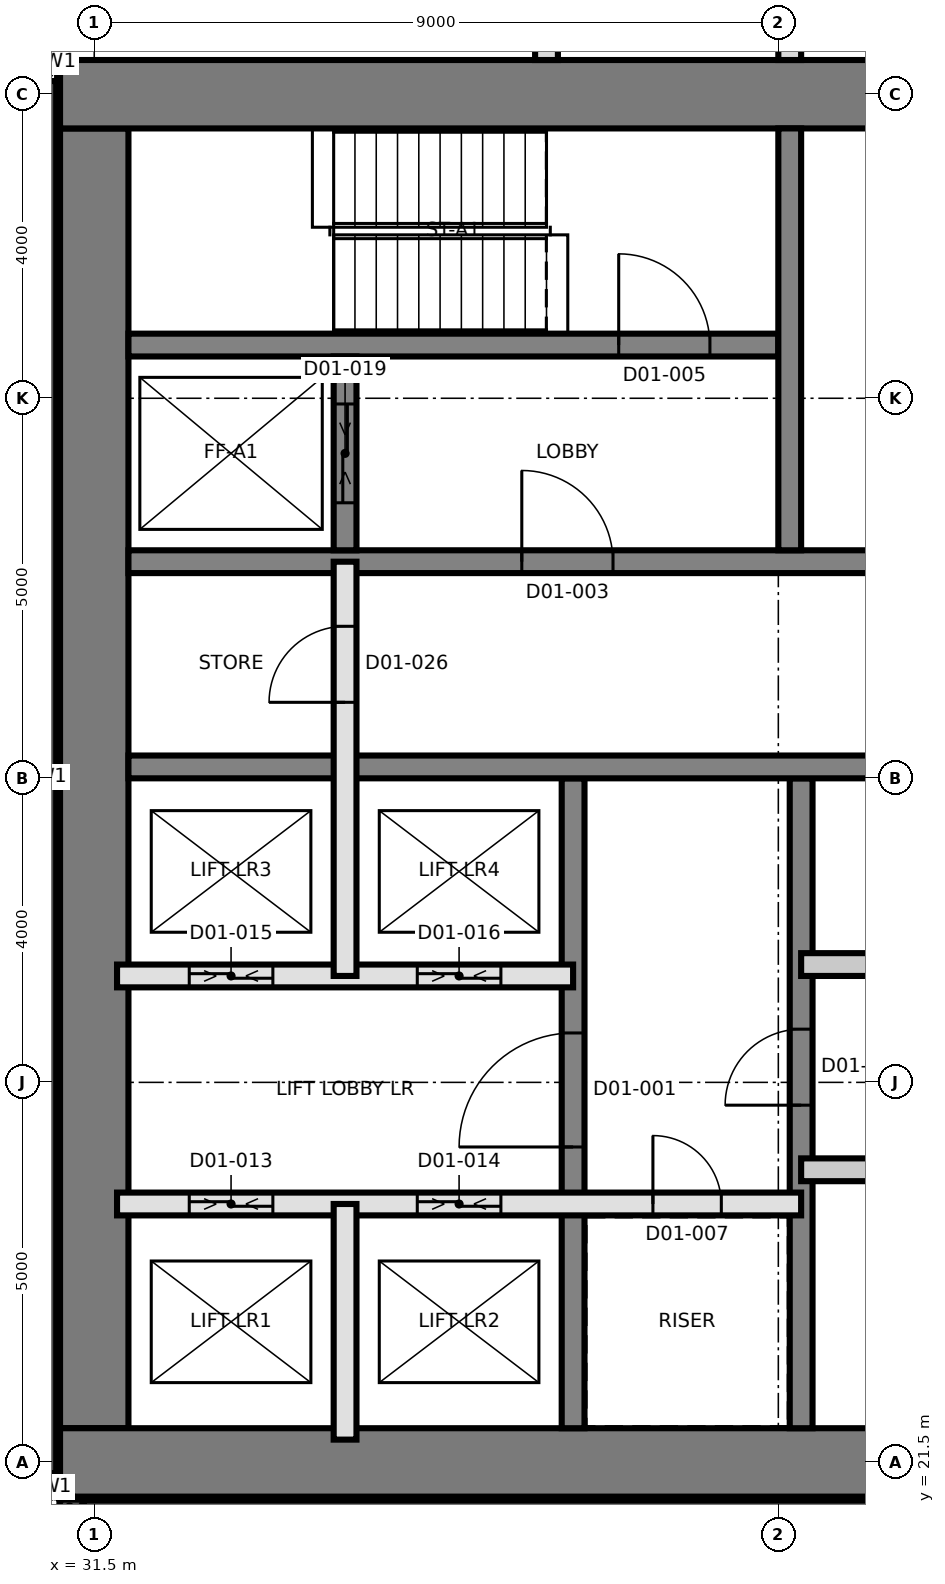
"""IFC4 building model, lengths in metres.
Left out: names, types, materials, properties, quantities, classifications, styles, units other than length and angle.
Written with IfcOpenShell. Run it as: python <this file> out.ifc"""

import sys

from ifc_helpers import new_model, si_unit, direction, frame, frame_2d, origin, place, context, subcontext, project, spatial, rectangle, extrude, element, fill, save


model = new_model("IFC4")
c1 = context("Model", 3, precision=1e-05, world=origin(), true_north=direction((0.0, 1.0)))
c2 = subcontext(c1, "Body", "Model", "MODEL_VIEW")
j1 = project(units=[si_unit("LENGTHUNIT", "METRE"), si_unit("PLANEANGLEUNIT", "RADIAN")], contexts=[c1])
p1 = place(None, origin())
s1 = spatial("IfcSite", under=j1, at=p1, CompositionType="ELEMENT")
p2 = place(p1, origin())
s2 = spatial("IfcBuilding", under=s1, at=p2, CompositionType="ELEMENT")
p3 = place(p2, frame((0.0, 0.0, 37.2)))
s3 = spatial("IfcBuildingStorey", under=s2, at=p3, CompositionType="ELEMENT", Elevation=37.2)
p4 = place(p3, frame((31.5, 21.95, 0.0), z_axis=(0.0, 0.0, 1.0), x_axis=(0.0, 1.0, 0.0)))
e1 = element("IfcWall", 1, at=p4, inside=s3, PredefinedType="SHEAR", context=c2, shape_type="SweptSolid", body=[
    extrude(rectangle(XDim=17.1, YDim=0.9, at=frame_2d((8.55, 0.0))), origin(), (0.0, 0.0, 1.0), 3.7),
])
p5 = place(p3, frame((31.05, 21.5, 0.0), z_axis=(0.0, 0.0, 1.0), x_axis=(1.0, 0.0, 0.0)))
e2 = element("IfcWall", 2, at=p5, inside=s3, PredefinedType="SHEAR", context=c2, shape_type="SweptSolid", body=[
    extrude(rectangle(XDim=27.0, YDim=0.9, at=frame_2d((13.5, 0.0))), origin(), (0.0, 0.0, 1.0), 3.7),
])
p6 = place(p3, frame((31.05, 39.5, 0.0), z_axis=(0.0, 0.0, 1.0), x_axis=(1.0, 0.0, 0.0)))
e3 = element("IfcWall", 3, at=p6, inside=s3, PredefinedType="SHEAR", context=c2, shape_type="SweptSolid", body=[
    extrude(rectangle(XDim=27.0, YDim=0.9, at=frame_2d((13.5, 0.0))), origin(), (0.0, 0.0, 1.0), 3.7),
])
p7 = place(p6, frame((10.65, 0.0, 0.0)))
e4 = element("IfcOpeningElement", 4, at=p7, cuts=e3, PredefinedType="OPENING", context=c2, shape_type="SweptSolid", body=[
    extrude(rectangle(XDim=1.2, YDim=2.1, at=frame_2d((0.6, 1.05))), frame((0.0, 0.46, 0.0), z_axis=(0.0, -1.0, 0.0), x_axis=(1.0, 0.0, 0.0)), (0.0, 0.0, 1.0), 0.92),
])
p8 = place(p3, frame((37.8, 21.95, 0.0), z_axis=(0.0, 0.0, 1.0), x_axis=(0.0, 1.0, 0.0)))
e5 = element("IfcWall", 5, at=p8, inside=s3, PredefinedType="SHEAR", context=c2, shape_type="SweptSolid", body=[
    extrude(rectangle(XDim=8.55, YDim=0.3, at=frame_2d((4.275, 0.0))), origin(), (0.0, 0.0, 1.0), 3.7),
])
p9 = place(p8, frame((3.7, 0.0, 0.0)))
e6 = element("IfcOpeningElement", 6, at=p9, cuts=e5, PredefinedType="OPENING", context=c2, shape_type="SweptSolid", body=[
    extrude(rectangle(XDim=1.5, YDim=2.1, at=frame_2d((0.75, 1.05))), frame((0.0, 0.16, 0.0), z_axis=(0.0, -1.0, 0.0), x_axis=(1.0, 0.0, 0.0)), (0.0, 0.0, 1.0), 0.32),
])
p10 = place(p3, frame((40.8, 21.95, 0.0), z_axis=(0.0, 0.0, 1.0), x_axis=(0.0, 1.0, 0.0)))
e7 = element("IfcWall", 7, at=p10, inside=s3, PredefinedType="SHEAR", context=c2, shape_type="SweptSolid", body=[
    extrude(rectangle(XDim=8.55, YDim=0.3, at=frame_2d((4.275, 0.0))), origin(), (0.0, 0.0, 1.0), 3.7),
])
p11 = place(p10, frame((4.25, 0.0, 0.0)))
e8 = element("IfcOpeningElement", 8, at=p11, cuts=e7, PredefinedType="OPENING", context=c2, shape_type="SweptSolid", body=[
    extrude(rectangle(XDim=1.0, YDim=2.1, at=frame_2d((0.5, 1.05))), frame((0.0, 0.16, 0.0), z_axis=(0.0, -1.0, 0.0), x_axis=(1.0, 0.0, 0.0)), (0.0, 0.0, 1.0), 0.32),
])
p12 = place(p3, frame((31.95, 30.65, 0.0), z_axis=(0.0, 0.0, 1.0), x_axis=(1.0, 0.0, 0.0)))
e9 = element("IfcWall", 9, at=p12, inside=s3, PredefinedType="SHEAR", context=c2, shape_type="SweptSolid", body=[
    extrude(rectangle(XDim=26.1, YDim=0.3, at=frame_2d((13.05, 0.0))), origin(), (0.0, 0.0, 1.0), 3.7),
])
p13 = place(p12, frame((24.55, 0.0, 0.0)))
e10 = element("IfcOpeningElement", 10, at=p13, cuts=e9, PredefinedType="OPENING", context=c2, shape_type="SweptSolid", body=[
    extrude(rectangle(XDim=1.0, YDim=2.1, at=frame_2d((0.5, 1.05))), frame((0.0, 0.16, 0.0), z_axis=(0.0, -1.0, 0.0), x_axis=(1.0, 0.0, 0.0)), (0.0, 0.0, 1.0), 0.32),
])
p14 = place(p12, frame((11.35, 0.0, 0.0)))
e11 = element("IfcOpeningElement", 11, at=p14, cuts=e9, PredefinedType="OPENING", context=c2, shape_type="SweptSolid", body=[
    extrude(rectangle(XDim=1.0, YDim=2.1, at=frame_2d((0.5, 1.05))), frame((0.0, 0.16, 0.0), z_axis=(0.0, -1.0, 0.0), x_axis=(1.0, 0.0, 0.0)), (0.0, 0.0, 1.0), 0.32),
])
p15 = place(p3, frame((31.95, 33.35, 0.0), z_axis=(0.0, 0.0, 1.0), x_axis=(1.0, 0.0, 0.0)))
e12 = element("IfcWall", 12, at=p15, inside=s3, PredefinedType="SHEAR", context=c2, shape_type="SweptSolid", body=[
    extrude(rectangle(XDim=26.1, YDim=0.3, at=frame_2d((13.05, 0.0))), origin(), (0.0, 0.0, 1.0), 3.7),
])
p16 = place(p15, frame((13.7, 0.0, 0.0)))
e13 = element("IfcOpeningElement", 13, at=p16, cuts=e12, PredefinedType="OPENING", context=c2, shape_type="SweptSolid", body=[
    extrude(rectangle(XDim=1.4, YDim=2.1, at=frame_2d((0.7, 1.05))), frame((0.0, 0.16, 0.0), z_axis=(0.0, -1.0, 0.0), x_axis=(1.0, 0.0, 0.0)), (0.0, 0.0, 1.0), 0.32),
])
p17 = place(p15, frame((5.175, 0.0, 0.0)))
e14 = element("IfcOpeningElement", 14, at=p17, cuts=e12, PredefinedType="OPENING", context=c2, shape_type="SweptSolid", body=[
    extrude(rectangle(XDim=1.2, YDim=2.1, at=frame_2d((0.6, 1.05))), frame((0.0, 0.16, 0.0), z_axis=(0.0, -1.0, 0.0), x_axis=(1.0, 0.0, 0.0)), (0.0, 0.0, 1.0), 0.32),
])
p18 = place(p15, frame((19.725, 0.0, 0.0)))
e15 = element("IfcOpeningElement", 15, at=p18, cuts=e12, PredefinedType="OPENING", context=c2, shape_type="SweptSolid", body=[
    extrude(rectangle(XDim=1.2, YDim=2.1, at=frame_2d((0.6, 1.05))), frame((0.0, 0.16, 0.0), z_axis=(0.0, -1.0, 0.0), x_axis=(1.0, 0.0, 0.0)), (0.0, 0.0, 1.0), 0.32),
])
p19 = place(p3, frame((31.95, 36.2, 0.0), z_axis=(0.0, 0.0, 1.0), x_axis=(1.0, 0.0, 0.0)))
e16 = element("IfcWall", 16, at=p19, inside=s3, PredefinedType="SHEAR", context=c2, shape_type="SweptSolid", body=[
    extrude(rectangle(XDim=8.55, YDim=0.3, at=frame_2d((4.275, 0.0))), origin(), (0.0, 0.0, 1.0), 3.7),
])
p20 = place(p19, frame((6.45, 0.0, 0.0)))
e17 = element("IfcOpeningElement", 17, at=p20, cuts=e16, PredefinedType="OPENING", context=c2, shape_type="SweptSolid", body=[
    extrude(rectangle(XDim=1.2, YDim=2.1, at=frame_2d((0.6, 1.05))), frame((0.0, 0.16, 0.0), z_axis=(0.0, -1.0, 0.0), x_axis=(1.0, 0.0, 0.0)), (0.0, 0.0, 1.0), 0.32),
])
p21 = place(p3, frame((40.65, 33.5, 0.0), z_axis=(0.0, 0.0, 1.0), x_axis=(0.0, 1.0, 0.0)))
e18 = element("IfcWall", 18, at=p21, inside=s3, PredefinedType="SHEAR", context=c2, shape_type="SweptSolid", body=[
    extrude(rectangle(XDim=5.55, YDim=0.3, at=frame_2d((2.775, 0.0))), origin(), (0.0, 0.0, 1.0), 3.7),
])
p22 = place(p3, frame((34.8, 33.5, 0.0), z_axis=(0.0, 0.0, 1.0), x_axis=(0.0, 1.0, 0.0)))
e19 = element("IfcWall", 19, at=p22, inside=s3, PredefinedType="SHEAR", context=c2, shape_type="SweptSolid", body=[
    extrude(rectangle(XDim=2.55, YDim=0.3, at=frame_2d((1.275, 0.0))), origin(), (0.0, 0.0, 1.0), 3.7),
])
p23 = place(p22, frame((0.625, 0.0, 0.0)))
e20 = element("IfcOpeningElement", 20, at=p23, cuts=e19, PredefinedType="OPENING", context=c2, shape_type="SweptSolid", body=[
    extrude(rectangle(XDim=1.3, YDim=2.4, at=frame_2d((0.65, 1.2))), frame((0.0, 0.16, 0.0), z_axis=(0.0, -1.0, 0.0), x_axis=(1.0, 0.0, 0.0)), (0.0, 0.0, 1.0), 0.32),
])
p24 = place(p3, frame((30.85, 39.674, 0.0), z_axis=(0.0, 0.0, 1.0), x_axis=(0.0, -1.0, 0.0)))
e21 = element("IfcWall", 21, at=p24, inside=s3, PredefinedType="SOLIDWALL", context=c2, shape_type="SweptSolid", body=[
    extrude(rectangle(XDim=18.314, YDim=0.3, at=frame_2d((9.157, 0.0))), origin(), (0.0, 0.0, 1.0), 3.4),
])
for number, where, z_axis, x_axis in (
    (22, (30.861, 21.302, 0.0), (0.0, 0.0, 1.0), (0.383, -0.924, 0.0)),
    (23, (31.048, 20.967, 0.0), (0.0, 0.0, 1.0), (0.924, -0.383, 0.0)),
):
    element("IfcWall", number, at=place(p3, frame(where, z_axis=z_axis, x_axis=x_axis)), inside=s3, PredefinedType="SOLIDWALL", context=c2, shape_type="SweptSolid", body=[
        extrude(rectangle(XDim=0.275, YDim=0.3, at=frame_2d((0.138, 0.0))), origin(), (0.0, 0.0, 1.0), 3.4),
    ])
p25 = place(p3, frame((31.36, 20.85, 0.0), z_axis=(0.0, 0.0, 1.0), x_axis=(1.0, 0.0, 0.0)))
e24 = element("IfcWall", 24, at=p25, inside=s3, PredefinedType="SOLIDWALL", context=c2, shape_type="SweptSolid", body=[
    extrude(rectangle(XDim=27.281, YDim=0.3, at=frame_2d((13.64, 0.0))), origin(), (0.0, 0.0, 1.0), 3.4),
])
p26 = place(p3, frame((31.8, 24.9, 0.0), z_axis=(0.0, 0.0, 1.0), x_axis=(1.0, 0.0, 0.0)))
e25 = element("IfcWall", 25, at=p26, inside=s3, PredefinedType="SOLIDWALL", context=c2, shape_type="SweptSolid", body=[
    extrude(rectangle(XDim=9.0, YDim=0.3, at=frame_2d((4.5, 0.0))), origin(), (0.0, 0.0, 1.0), 3.4),
])
p27 = place(p26, frame((7.05, 0.0, 0.0)))
e26 = element("IfcOpeningElement", 26, at=p27, cuts=e25, PredefinedType="OPENING", context=c2, shape_type="SweptSolid", body=[
    extrude(rectangle(XDim=0.9, YDim=2.1, at=frame_2d((0.45, 1.05))), frame((0.0, 0.16, 0.0), z_axis=(0.0, -1.0, 0.0), x_axis=(1.0, 0.0, 0.0)), (0.0, 0.0, 1.0), 0.32),
])
p28 = place(p26, frame((0.95, 0.0, 0.0)))
e27 = element("IfcOpeningElement", 27, at=p28, cuts=e25, PredefinedType="OPENING", context=c2, shape_type="SweptSolid", body=[
    extrude(rectangle(XDim=1.1, YDim=2.4, at=frame_2d((0.55, 1.2))), frame((0.0, 0.16, 0.0), z_axis=(0.0, -1.0, 0.0), x_axis=(1.0, 0.0, 0.0)), (0.0, 0.0, 1.0), 0.32),
])
p29 = place(p26, frame((3.95, 0.0, 0.0)))
e28 = element("IfcOpeningElement", 28, at=p29, cuts=e25, PredefinedType="OPENING", context=c2, shape_type="SweptSolid", body=[
    extrude(rectangle(XDim=1.1, YDim=2.4, at=frame_2d((0.55, 1.2))), frame((0.0, 0.16, 0.0), z_axis=(0.0, -1.0, 0.0), x_axis=(1.0, 0.0, 0.0)), (0.0, 0.0, 1.0), 0.32),
])
p30 = place(p3, frame((40.8, 25.35, 0.0), z_axis=(0.0, 0.0, 1.0), x_axis=(1.0, 0.0, 0.0)))
e29 = element("IfcWall", 29, at=p30, inside=s3, PredefinedType="PARTITIONING", context=c2, shape_type="SweptSolid", body=[
    extrude(rectangle(XDim=6.0, YDim=0.3, at=frame_2d((3.0, 0.0))), origin(), (0.0, 0.0, 1.0), 3.4),
])
p31 = place(p30, frame((2.5, 0.0, 0.0)))
e30 = element("IfcOpeningElement", 30, at=p31, cuts=e29, PredefinedType="OPENING", context=c2, shape_type="SweptSolid", body=[
    extrude(rectangle(XDim=1.0, YDim=2.1, at=frame_2d((0.5, 1.05))), frame((0.0, 0.16, 0.0), z_axis=(0.0, -1.0, 0.0), x_axis=(1.0, 0.0, 0.0)), (0.0, 0.0, 1.0), 0.32),
])
p32 = place(p3, frame((31.8, 27.9, 0.0), z_axis=(0.0, 0.0, 1.0), x_axis=(1.0, 0.0, 0.0)))
e31 = element("IfcWall", 31, at=p32, inside=s3, PredefinedType="SOLIDWALL", context=c2, shape_type="SweptSolid", body=[
    extrude(rectangle(XDim=6.0, YDim=0.3, at=frame_2d((3.0, 0.0))), origin(), (0.0, 0.0, 1.0), 3.4),
])
p33 = place(p32, frame((0.95, 0.0, 0.0)))
e32 = element("IfcOpeningElement", 32, at=p33, cuts=e31, PredefinedType="OPENING", context=c2, shape_type="SweptSolid", body=[
    extrude(rectangle(XDim=1.1, YDim=2.4, at=frame_2d((0.55, 1.2))), frame((0.0, 0.16, 0.0), z_axis=(0.0, -1.0, 0.0), x_axis=(1.0, 0.0, 0.0)), (0.0, 0.0, 1.0), 0.32),
])
p34 = place(p32, frame((3.95, 0.0, 0.0)))
e33 = element("IfcOpeningElement", 33, at=p34, cuts=e31, PredefinedType="OPENING", context=c2, shape_type="SweptSolid", body=[
    extrude(rectangle(XDim=1.1, YDim=2.4, at=frame_2d((0.55, 1.2))), frame((0.0, 0.16, 0.0), z_axis=(0.0, -1.0, 0.0), x_axis=(1.0, 0.0, 0.0)), (0.0, 0.0, 1.0), 0.32),
])
p35 = place(p3, frame((40.8, 28.05, 0.0), z_axis=(0.0, 0.0, 1.0), x_axis=(1.0, 0.0, 0.0)))
e34 = element("IfcWall", 34, at=p35, inside=s3, PredefinedType="PARTITIONING", context=c2, shape_type="SweptSolid", body=[
    extrude(rectangle(XDim=6.0, YDim=0.3, at=frame_2d((3.0, 0.0))), origin(), (0.0, 0.0, 1.0), 3.4),
])
p36 = place(p3, frame((34.8, 21.8, 0.0), z_axis=(0.0, 0.0, 1.0), x_axis=(0.0, 1.0, 0.0)))
e35 = element("IfcWall", 35, at=p36, inside=s3, PredefinedType="SOLIDWALL", context=c2, shape_type="SweptSolid", body=[
    extrude(rectangle(XDim=3.1, YDim=0.3, at=frame_2d((1.55, 0.0))), origin(), (0.0, 0.0, 1.0), 3.4),
])
p37 = place(p3, frame((34.8, 27.9, 0.0), z_axis=(0.0, 0.0, 1.0), x_axis=(0.0, 1.0, 0.0)))
e36 = element("IfcWall", 36, at=p37, inside=s3, PredefinedType="SOLIDWALL", context=c2, shape_type="SweptSolid", body=[
    extrude(rectangle(XDim=5.45, YDim=0.3, at=frame_2d((2.725, 0.0))), origin(), (0.0, 0.0, 1.0), 3.4),
])
p38 = place(p37, frame((3.6, 0.0, 0.0)))
e37 = element("IfcOpeningElement", 37, at=p38, cuts=e36, PredefinedType="OPENING", context=c2, shape_type="SweptSolid", body=[
    extrude(rectangle(XDim=1.0, YDim=2.1, at=frame_2d((0.5, 1.05))), frame((0.0, 0.16, 0.0), z_axis=(0.0, -1.0, 0.0), x_axis=(1.0, 0.0, 0.0)), (0.0, 0.0, 1.0), 0.32),
])
p39 = place(p3, frame((37.45, 39.95, 0.0), z_axis=(0.0, 0.0, 1.0), x_axis=(0.0, 1.0, 0.0)))
e38 = element("IfcWall", 38, at=p39, inside=s3, PredefinedType="PARTITIONING", context=c2, shape_type="SweptSolid", body=[
    extrude(rectangle(XDim=2.25, YDim=0.3, at=frame_2d((1.125, 0.0))), origin(), (0.0, 0.0, 1.0), 3.4),
])
p40 = place(p39, frame((0.5, 0.0, 0.0)))
e39 = element("IfcOpeningElement", 39, at=p40, cuts=e38, PredefinedType="OPENING", context=c2, shape_type="SweptSolid", body=[
    extrude(rectangle(XDim=0.8, YDim=2.1, at=frame_2d((0.4, 1.05))), frame((0.0, 0.16, 0.0), z_axis=(0.0, -1.0, 0.0), x_axis=(1.0, 0.0, 0.0)), (0.0, 0.0, 1.0), 0.32),
])
p41 = place(p3, frame((40.65, 39.95, 0.0), z_axis=(0.0, 0.0, 1.0), x_axis=(0.0, 1.0, 0.0)))
e40 = element("IfcWall", 40, at=p41, inside=s3, PredefinedType="PARTITIONING", context=c2, shape_type="SweptSolid", body=[
    extrude(rectangle(XDim=35.625, YDim=0.3, at=frame_2d((17.812, 0.0))), origin(), (0.0, 0.0, 1.0), 3.4),
])
p42 = place(p41, frame((2.83, 0.0, 0.0)))
e41 = element("IfcOpeningElement", 41, at=p42, cuts=e40, PredefinedType="OPENING", context=c2, shape_type="SweptSolid", body=[
    extrude(rectangle(XDim=1.0, YDim=2.1, at=frame_2d((0.5, 1.05))), frame((0.0, 0.16, 0.0), z_axis=(0.0, -1.0, 0.0), x_axis=(1.0, 0.0, 0.0)), (0.0, 0.0, 1.0), 0.32),
])
p43 = place(p41, frame((4.63, 0.0, 0.0)))
e42 = element("IfcOpeningElement", 42, at=p43, cuts=e40, PredefinedType="OPENING", context=c2, shape_type="SweptSolid", body=[
    extrude(rectangle(XDim=1.0, YDim=2.1, at=frame_2d((0.5, 1.05))), frame((0.0, 0.16, 0.0), z_axis=(0.0, -1.0, 0.0), x_axis=(1.0, 0.0, 0.0)), (0.0, 0.0, 1.0), 0.32),
])
p44 = place(p41, frame((11.47, 0.0, 0.0)))
e43 = element("IfcOpeningElement", 43, at=p44, cuts=e40, PredefinedType="OPENING", context=c2, shape_type="SweptSolid", body=[
    extrude(rectangle(XDim=1.0, YDim=2.1, at=frame_2d((0.5, 1.05))), frame((0.0, 0.16, 0.0), z_axis=(0.0, -1.0, 0.0), x_axis=(1.0, 0.0, 0.0)), (0.0, 0.0, 1.0), 0.32),
])
p45 = place(p41, frame((13.27, 0.0, 0.0)))
e44 = element("IfcOpeningElement", 44, at=p45, cuts=e40, PredefinedType="OPENING", context=c2, shape_type="SweptSolid", body=[
    extrude(rectangle(XDim=1.0, YDim=2.1, at=frame_2d((0.5, 1.05))), frame((0.0, 0.16, 0.0), z_axis=(0.0, -1.0, 0.0), x_axis=(1.0, 0.0, 0.0)), (0.0, 0.0, 1.0), 0.32),
])
p46 = place(p41, frame((21.05, 0.0, 0.0)))
e45 = element("IfcOpeningElement", 45, at=p46, cuts=e40, PredefinedType="OPENING", context=c2, shape_type="SweptSolid", body=[
    extrude(rectangle(XDim=1.0, YDim=2.4, at=frame_2d((0.5, 1.2))), frame((0.0, 0.16, 0.0), z_axis=(0.0, -1.0, 0.0), x_axis=(1.0, 0.0, 0.0)), (0.0, 0.0, 1.0), 0.32),
])
p47 = place(p9, origin())
e46 = element("IfcDoor", 46, at=p47, inside=s3, OperationType="SINGLE_SWING_LEFT", PredefinedType="DOOR", context=c2, shape_type="SweptSolid", body=[
    extrude(rectangle(XDim=1.5, YDim=2.1, at=frame_2d((0.75, 1.05))), frame((0.0, 0.025, 0.0), z_axis=(0.0, -1.0, 0.0), x_axis=(1.0, 0.0, 0.0)), (0.0, 0.0, 1.0), 0.05),
])
fill(e6, e46)
p48 = place(p17, origin())
e47 = element("IfcDoor", 47, at=p48, inside=s3, OperationType="SINGLE_SWING_LEFT", PredefinedType="DOOR", context=c2, shape_type="SweptSolid", body=[
    extrude(rectangle(XDim=1.2, YDim=2.1, at=frame_2d((0.6, 1.05))), frame((0.0, 0.025, 0.0), z_axis=(0.0, -1.0, 0.0), x_axis=(1.0, 0.0, 0.0)), (0.0, 0.0, 1.0), 0.05),
])
fill(e14, e47)
p49 = place(p20, origin())
e48 = element("IfcDoor", 48, at=p49, inside=s3, OperationType="SINGLE_SWING_RIGHT", PredefinedType="DOOR", context=c2, shape_type="SweptSolid", body=[
    extrude(rectangle(XDim=1.2, YDim=2.1, at=frame_2d((0.6, 1.05))), frame((0.0, 0.025, 0.0), z_axis=(0.0, -1.0, 0.0), x_axis=(1.0, 0.0, 0.0)), (0.0, 0.0, 1.0), 0.05),
])
fill(e17, e48)
p50 = place(p27, origin())
e49 = element("IfcDoor", 49, at=p50, inside=s3, OperationType="SINGLE_SWING_LEFT", PredefinedType="DOOR", context=c2, shape_type="SweptSolid", body=[
    extrude(rectangle(XDim=0.9, YDim=2.1, at=frame_2d((0.45, 1.05))), frame((0.0, 0.025, 0.0), z_axis=(0.0, -1.0, 0.0), x_axis=(1.0, 0.0, 0.0)), (0.0, 0.0, 1.0), 0.05),
])
fill(e26, e49)
p51 = place(p28, origin())
e50 = element("IfcDoor", 50, at=p51, inside=s3, OperationType="SLIDING_TO_LEFT", PredefinedType="DOOR", context=c2, shape_type="SweptSolid", body=[
    extrude(rectangle(XDim=1.1, YDim=2.4, at=frame_2d((0.55, 1.2))), frame((0.0, 0.025, 0.0), z_axis=(0.0, -1.0, 0.0), x_axis=(1.0, 0.0, 0.0)), (0.0, 0.0, 1.0), 0.05),
])
fill(e27, e50)
p52 = place(p29, origin())
e51 = element("IfcDoor", 51, at=p52, inside=s3, OperationType="SLIDING_TO_LEFT", PredefinedType="DOOR", context=c2, shape_type="SweptSolid", body=[
    extrude(rectangle(XDim=1.1, YDim=2.4, at=frame_2d((0.55, 1.2))), frame((0.0, 0.025, 0.0), z_axis=(0.0, -1.0, 0.0), x_axis=(1.0, 0.0, 0.0)), (0.0, 0.0, 1.0), 0.05),
])
fill(e28, e51)
p53 = place(p33, origin())
e52 = element("IfcDoor", 52, at=p53, inside=s3, OperationType="SLIDING_TO_LEFT", PredefinedType="DOOR", context=c2, shape_type="SweptSolid", body=[
    extrude(rectangle(XDim=1.1, YDim=2.4, at=frame_2d((0.55, 1.2))), frame((0.0, 0.025, 0.0), z_axis=(0.0, -1.0, 0.0), x_axis=(1.0, 0.0, 0.0)), (0.0, 0.0, 1.0), 0.05),
])
fill(e32, e52)
p54 = place(p34, origin())
e53 = element("IfcDoor", 53, at=p54, inside=s3, OperationType="SLIDING_TO_LEFT", PredefinedType="DOOR", context=c2, shape_type="SweptSolid", body=[
    extrude(rectangle(XDim=1.1, YDim=2.4, at=frame_2d((0.55, 1.2))), frame((0.0, 0.025, 0.0), z_axis=(0.0, -1.0, 0.0), x_axis=(1.0, 0.0, 0.0)), (0.0, 0.0, 1.0), 0.05),
])
fill(e33, e53)
p55 = place(p23, origin())
e54 = element("IfcDoor", 54, at=p55, inside=s3, OperationType="SLIDING_TO_LEFT", PredefinedType="DOOR", context=c2, shape_type="SweptSolid", body=[
    extrude(rectangle(XDim=1.3, YDim=2.4, at=frame_2d((0.65, 1.2))), frame((0.0, 0.025, 0.0), z_axis=(0.0, -1.0, 0.0), x_axis=(1.0, 0.0, 0.0)), (0.0, 0.0, 1.0), 0.05),
])
fill(e20, e54)
p56 = place(p11, origin())
e55 = element("IfcDoor", 55, at=p56, inside=s3, OperationType="SINGLE_SWING_RIGHT", PredefinedType="DOOR", context=c2, shape_type="SweptSolid", body=[
    extrude(rectangle(XDim=1.0, YDim=2.1, at=frame_2d((0.5, 1.05))), frame((0.0, 0.025, 0.0), z_axis=(0.0, -1.0, 0.0), x_axis=(1.0, 0.0, 0.0)), (0.0, 0.0, 1.0), 0.05),
])
fill(e8, e55)
p57 = place(p38, origin())
e56 = element("IfcDoor", 56, at=p57, inside=s3, OperationType="SINGLE_SWING_RIGHT", PredefinedType="DOOR", context=c2, shape_type="SweptSolid", body=[
    extrude(rectangle(XDim=1.0, YDim=2.1, at=frame_2d((0.5, 1.05))), frame((0.0, 0.025, 0.0), z_axis=(0.0, -1.0, 0.0), x_axis=(1.0, 0.0, 0.0)), (0.0, 0.0, 1.0), 0.05),
])
fill(e37, e56)
save(model, sys.argv[1])
